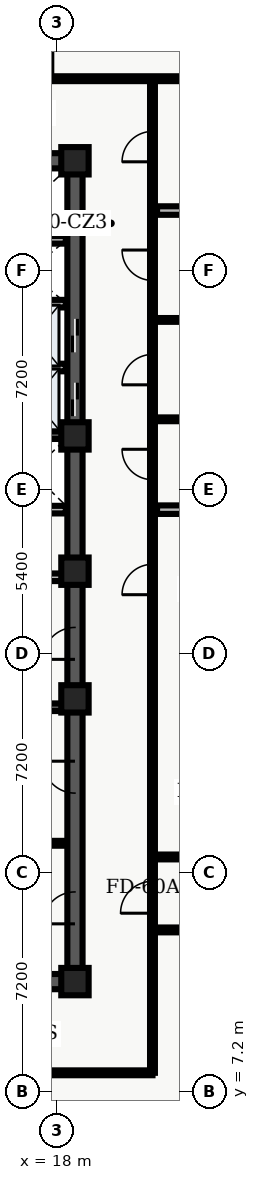
"""IFC4 building model, lengths in metres.
Left out: names, types, materials, properties, quantities, classifications, styles, units other than length and angle.
Written with IfcOpenShell. Run it as: python <this file> out.ifc"""

import sys

from ifc_helpers import new_model, entity, si_unit, converted_unit, direction, frame, origin_with_axes, origin_2d_with_axis, place, context, subcontext, project, spatial, polyline, rectangle, outline, extrude, element, fill, save


model = new_model("IFC4")
c1 = context("Model", 3, precision=1e-05, world=origin_with_axes(), true_north=direction((0.0, 1.0)))
c2 = subcontext(c1, "Body", "Model", "MODEL_VIEW")
j1 = project(units=[si_unit("LENGTHUNIT", "METRE"), converted_unit("PLANEANGLEUNIT", "DEGREE", entity("IfcPlaneAngleMeasure", 0.017), si_unit("PLANEANGLEUNIT", "RADIAN"), dimensions=[0, 0, 0, 0, 0, 0, 0])], contexts=[c1])
p1 = place(None, origin_with_axes())
s1 = spatial("IfcSite", under=j1, at=p1, CompositionType="ELEMENT")
p2 = place(p1, origin_with_axes())
s2 = spatial("IfcBuilding", under=s1, at=p2, CompositionType="ELEMENT")
p3 = place(p2, frame((0.0, 0.0, 204.3), z_axis=(0.0, 0.0, 1.0), x_axis=(1.0, 0.0, 0.0)))
s3 = spatial("IfcBuildingStorey", under=s2, at=p3, CompositionType="ELEMENT", Elevation=204.3)
p4 = place(p3, frame((11.4, 10.8, 0.0), z_axis=(0.0, 0.0, 1.0), x_axis=(1.0, 0.0, 0.0)))
e1 = element("IfcWall", 1, at=p4, inside=s3, PredefinedType="SHEAR", context=c2, shape_type="SweptSolid", body=[
    extrude(outline(polyline([(0.0, -0.25), (7.2, -0.25), (7.2, 0.25), (0.0, 0.25), (0.0, -0.25)])), origin_with_axes(), (0.0, 0.0, 1.0), 3.66),
])
p5 = place(p4, frame((2.625, 0.0, 0.0), z_axis=(0.0, 0.0, 1.0), x_axis=(1.0, 0.0, 0.0)))
e2 = element("IfcOpeningElement", 2, at=p5, cuts=e1, PredefinedType="OPENING", context=c2, shape_type="SweptSolid", body=[
    extrude(rectangle(XDim=1.05, YDim=0.52, at=origin_2d_with_axis()), origin_with_axes(), (0.0, 0.0, 1.0), 2.15),
])
p6 = place(p3, frame((11.4, 37.8, 0.0), z_axis=(0.0, 0.0, 1.0), x_axis=(1.0, 0.0, 0.0)))
e3 = element("IfcWall", 3, at=p6, inside=s3, PredefinedType="SHEAR", context=c2, shape_type="SweptSolid", body=[
    extrude(outline(polyline([(0.0, -0.25), (7.2, -0.25), (7.2, 0.25), (0.0, 0.25), (0.0, -0.25)])), origin_with_axes(), (0.0, 0.0, 1.0), 3.66),
])
p7 = place(p6, frame((2.625, 0.0, 0.0), z_axis=(0.0, 0.0, 1.0), x_axis=(1.0, 0.0, 0.0)))
e4 = element("IfcOpeningElement", 4, at=p7, cuts=e3, PredefinedType="OPENING", context=c2, shape_type="SweptSolid", body=[
    extrude(rectangle(XDim=1.05, YDim=0.52, at=origin_2d_with_axis()), origin_with_axes(), (0.0, 0.0, 1.0), 2.15),
])
p8 = place(p3, frame((18.6, 10.8, 0.0), z_axis=(0.0, 0.0, 1.0), x_axis=(0.0, 1.0, 0.0)))
e5 = element("IfcWall", 5, at=p8, inside=s3, PredefinedType="SHEAR", context=c2, shape_type="SweptSolid", body=[
    extrude(outline(polyline([(0.0, -0.25), (13.5, -0.25), (13.5, 0.25), (0.0, 0.25), (0.0, -0.25)])), origin_with_axes(), (0.0, 0.0, 1.0), 3.66),
])
p9 = place(p8, frame((11.125, 0.0, 0.0), z_axis=(0.0, 0.0, 1.0), x_axis=(1.0, 0.0, 0.0)))
e6 = element("IfcOpeningElement", 6, at=p9, cuts=e5, PredefinedType="OPENING", context=c2, shape_type="SweptSolid", body=[
    extrude(rectangle(XDim=1.05, YDim=0.52, at=origin_2d_with_axis()), origin_with_axes(), (0.0, 0.0, 1.0), 2.15),
])
p10 = place(p8, frame((2.425, 0.0, 0.0), z_axis=(0.0, 0.0, 1.0), x_axis=(1.0, 0.0, 0.0)))
e7 = element("IfcOpeningElement", 7, at=p10, cuts=e5, PredefinedType="OPENING", context=c2, shape_type="SweptSolid", body=[
    extrude(rectangle(XDim=1.05, YDim=0.52, at=origin_2d_with_axis()), origin_with_axes(), (0.0, 0.0, 1.0), 2.15),
])
p11 = place(p8, frame((6.725, 0.0, 0.0), z_axis=(0.0, 0.0, 1.0), x_axis=(1.0, 0.0, 0.0)))
e8 = element("IfcOpeningElement", 8, at=p11, cuts=e5, PredefinedType="OPENING", context=c2, shape_type="SweptSolid", body=[
    extrude(rectangle(XDim=1.05, YDim=0.52, at=origin_2d_with_axis()), origin_with_axes(), (0.0, 0.0, 1.0), 2.15),
])
p12 = place(p3, frame((18.6, 24.3, 0.0), z_axis=(0.0, 0.0, 1.0), x_axis=(0.0, 1.0, 0.0)))
e9 = element("IfcWall", 9, at=p12, inside=s3, PredefinedType="SHEAR", context=c2, shape_type="SweptSolid", body=[
    extrude(outline(polyline([(0.0, -0.25), (13.5, -0.25), (13.5, 0.25), (0.0, 0.25), (0.0, -0.25)])), origin_with_axes(), (0.0, 0.0, 1.0), 3.66),
])
p13 = place(p12, frame((5.65, 0.0, 0.0), z_axis=(0.0, 0.0, 1.0), x_axis=(1.0, 0.0, 0.0)))
e10 = element("IfcOpeningElement", 10, at=p13, cuts=e9, PredefinedType="OPENING", context=c2, shape_type="SweptSolid", body=[
    extrude(rectangle(XDim=1.1, YDim=0.52, at=origin_2d_with_axis()), origin_with_axes(), (0.0, 0.0, 1.0), 2.15),
])
p14 = place(p12, frame((7.75, 0.0, 0.0), z_axis=(0.0, 0.0, 1.0), x_axis=(1.0, 0.0, 0.0)))
e11 = element("IfcOpeningElement", 11, at=p14, cuts=e9, PredefinedType="OPENING", context=c2, shape_type="SweptSolid", body=[
    extrude(rectangle(XDim=1.1, YDim=0.52, at=origin_2d_with_axis()), origin_with_axes(), (0.0, 0.0, 1.0), 2.15),
])
for number, where, z_axis, x_axis in (
    (12, (11.65, 19.825, 0.0), (0.0, 0.0, 1.0), (1.0, 0.0, 0.0)),
    (13, (11.65, 28.775, 0.0), (0.0, 0.0, 1.0), (1.0, 0.0, 0.0)),
):
    element("IfcWall", number, at=place(p3, frame(where, z_axis=z_axis, x_axis=x_axis)), inside=s3, PredefinedType="SHEAR", context=c2, shape_type="SweptSolid", body=[
        extrude(outline(polyline([(0.0, -0.125), (6.7, -0.125), (6.7, 0.125), (0.0, 0.125), (0.0, -0.125)])), origin_with_axes(), (0.0, 0.0, 1.0), 3.66),
    ])
p15 = place(p3, frame((11.7, 24.1, 0.0), z_axis=(0.0, 0.0, 1.0), x_axis=(1.0, 0.0, 0.0)))
e14 = element("IfcWall", 14, at=p15, inside=s3, PredefinedType="SOLIDWALL", context=c2, shape_type="SweptSolid", body=[
    extrude(outline(polyline([(0.0, -0.125), (6.6, -0.125), (6.6, 0.125), (0.0, 0.125), (0.0, -0.125)])), origin_with_axes(), (0.0, 0.0, 1.0), 2.7),
])
p16 = place(p15, frame((3.6, 0.0, 0.0), z_axis=(0.0, 0.0, 1.0), x_axis=(1.0, 0.0, 0.0)))
e15 = element("IfcOpeningElement", 15, at=p16, cuts=e14, PredefinedType="OPENING", context=c2, shape_type="SweptSolid", body=[
    extrude(rectangle(XDim=0.9, YDim=0.27, at=origin_2d_with_axis()), origin_with_axes(), (0.0, 0.0, 1.0), 2.15),
])
p17 = place(p15, frame((5.65, 0.0, 0.0), z_axis=(0.0, 0.0, 1.0), x_axis=(1.0, 0.0, 0.0)))
e16 = element("IfcOpeningElement", 16, at=p17, cuts=e14, PredefinedType="OPENING", context=c2, shape_type="SweptSolid", body=[
    extrude(rectangle(XDim=0.9, YDim=0.27, at=origin_2d_with_axis()), origin_with_axes(), (0.0, 0.0, 1.0), 2.15),
])
p18 = place(p3, frame((11.7, 26.325, 0.0), z_axis=(0.0, 0.0, 1.0), x_axis=(1.0, 0.0, 0.0)))
e17 = element("IfcWall", 17, at=p18, inside=s3, PredefinedType="SOLIDWALL", context=c2, shape_type="SweptSolid", body=[
    extrude(outline(polyline([(0.0, -0.125), (6.6, -0.125), (6.6, 0.125), (0.0, 0.125), (0.0, -0.125)])), origin_with_axes(), (0.0, 0.0, 1.0), 2.7),
])
p19 = place(p18, frame((3.5, 0.0, 0.0), z_axis=(0.0, 0.0, 1.0), x_axis=(1.0, 0.0, 0.0)))
e18 = element("IfcOpeningElement", 18, at=p19, cuts=e17, PredefinedType="OPENING", context=c2, shape_type="SweptSolid", body=[
    extrude(rectangle(XDim=0.9, YDim=0.27, at=origin_2d_with_axis()), origin_with_axes(), (0.0, 0.0, 1.0), 2.15),
])
for number, where, z_axis, x_axis in (
    (19, (18.6, 10.8, 0.0), (0.0, 0.0, 1.0), (1.0, 0.0, 0.0)),
    (20, (18.6, 20.1, 0.0), (0.0, 0.0, 1.0), (1.0, 0.0, 0.0)),
    (21, (18.6, 24.3, 0.0), (0.0, 0.0, 1.0), (1.0, 0.0, 0.0)),
    (22, (18.6, 28.75, 0.0), (0.0, 0.0, 1.0), (1.0, 0.0, 0.0)),
    (23, (18.6, 37.8, 0.0), (0.0, 0.0, 1.0), (1.0, 0.0, 0.0)),
):
    element("IfcColumn", number, at=place(p3, frame(where, z_axis=z_axis, x_axis=x_axis)), inside=s3, PredefinedType="COLUMN", context=c2, shape_type="SweptSolid", body=[
        extrude(rectangle(XDim=0.9, YDim=0.9, at=origin_2d_with_axis()), origin_with_axes(), (0.0, 0.0, 1.0), 3.9),
    ])
p20 = place(p3, frame((15.84, 15.35, 0.0), z_axis=(0.0, 0.0, 1.0), x_axis=(1.0, 0.0, 0.0)))
e24 = element("IfcWall", 24, at=p20, inside=s3, PredefinedType="PARTITIONING", context=c2, shape_type="SweptSolid", body=[
    extrude(outline(polyline([(0.0, -0.08), (2.46, -0.08), (2.46, 0.08), (0.0, 0.08), (0.0, -0.08)])), origin_with_axes(), (0.0, 0.0, 1.0), 2.7),
])
for number, where, z_axis, x_axis in (
    (25, (15.84, 31.0, 0.0), (0.0, 0.0, 1.0), (1.0, 0.0, 0.0)),
    (26, (15.84, 33.1, 0.0), (0.0, 0.0, 1.0), (1.0, 0.0, 0.0)),
    (27, (15.84, 35.2, 0.0), (0.0, 0.0, 1.0), (1.0, 0.0, 0.0)),
):
    element("IfcWall", number, at=place(p3, frame(where, z_axis=z_axis, x_axis=x_axis)), inside=s3, PredefinedType="SOLIDWALL", context=c2, shape_type="SweptSolid", body=[
        extrude(outline(polyline([(0.0, -0.125), (2.46, -0.125), (2.46, 0.125), (0.0, 0.125), (0.0, -0.125)])), origin_with_axes(), (0.0, 0.0, 1.0), 2.7),
    ])
p21 = place(p3, frame((2.6, 7.8, 0.0), z_axis=(0.0, 0.0, 1.0), x_axis=(1.0, 0.0, 0.0)))
e28 = element("IfcWall", 28, at=p21, inside=s3, PredefinedType="PARTITIONING", context=c2, shape_type="SweptSolid", body=[
    extrude(outline(polyline([(0.0, -0.08), (18.55, -0.08), (18.55, 0.08), (0.0, 0.08), (0.0, -0.08)])), origin_with_axes(), (0.0, 0.0, 1.0), 2.7),
])
p22 = place(p21, frame((9.245, 0.0, 0.0), z_axis=(0.0, 0.0, 1.0), x_axis=(1.0, 0.0, 0.0)))
e29 = element("IfcOpeningElement", 29, at=p22, cuts=e28, PredefinedType="OPENING", context=c2, shape_type="SweptSolid", body=[
    extrude(rectangle(XDim=1.0, YDim=0.18, at=origin_2d_with_axis()), origin_with_axes(), (0.0, 0.0, 1.0), 2.15),
])
p23 = place(p3, frame((2.6, 40.5, 0.0), z_axis=(0.0, 0.0, 1.0), x_axis=(1.0, 0.0, 0.0)))
e30 = element("IfcWall", 30, at=p23, inside=s3, PredefinedType="PARTITIONING", context=c2, shape_type="SweptSolid", body=[
    extrude(outline(polyline([(0.0, -0.08), (26.946, -0.08), (26.946, 0.08), (0.0, 0.08), (0.0, -0.08)])), origin_with_axes(), (0.0, 0.0, 1.0), 2.7),
])
p24 = place(p23, frame((1.768, 0.0, 0.0), z_axis=(0.0, 0.0, 1.0), x_axis=(1.0, 0.0, 0.0)))
e31 = element("IfcOpeningElement", 31, at=p24, cuts=e30, PredefinedType="OPENING", context=c2, shape_type="SweptSolid", body=[
    extrude(rectangle(XDim=1.0, YDim=0.18, at=origin_2d_with_axis()), origin_with_axes(), (0.0, 0.0, 1.0), 2.15),
])
p25 = place(p23, frame((7.824, 0.0, 0.0), z_axis=(0.0, 0.0, 1.0), x_axis=(1.0, 0.0, 0.0)))
e32 = element("IfcOpeningElement", 32, at=p25, cuts=e30, PredefinedType="OPENING", context=c2, shape_type="SweptSolid", body=[
    extrude(rectangle(XDim=1.0, YDim=0.18, at=origin_2d_with_axis()), origin_with_axes(), (0.0, 0.0, 1.0), 2.15),
])
p26 = place(p23, frame((10.411, 0.0, 0.0), z_axis=(0.0, 0.0, 1.0), x_axis=(1.0, 0.0, 0.0)))
e33 = element("IfcOpeningElement", 33, at=p26, cuts=e30, PredefinedType="OPENING", context=c2, shape_type="SweptSolid", body=[
    extrude(rectangle(XDim=1.0, YDim=0.18, at=origin_2d_with_axis()), origin_with_axes(), (0.0, 0.0, 1.0), 2.15),
])
p27 = place(p23, frame((14.771, 0.0, 0.0), z_axis=(0.0, 0.0, 1.0), x_axis=(1.0, 0.0, 0.0)))
e34 = element("IfcOpeningElement", 34, at=p27, cuts=e30, PredefinedType="OPENING", context=c2, shape_type="SweptSolid", body=[
    extrude(rectangle(XDim=1.0, YDim=0.18, at=origin_2d_with_axis()), origin_with_axes(), (0.0, 0.0, 1.0), 2.15),
])
p28 = place(p3, frame((21.15, 7.8, 0.0), z_axis=(0.0, 0.0, 1.0), x_axis=(0.0, 1.0, 0.0)))
e35 = element("IfcWall", 35, at=p28, inside=s3, PredefinedType="PARTITIONING", context=c2, shape_type="SweptSolid", body=[
    extrude(outline(polyline([(0.0, -0.08), (32.7, -0.08), (32.7, 0.08), (0.0, 0.08), (0.0, -0.08)])), origin_with_axes(), (0.0, 0.0, 1.0), 2.7),
])
p29 = place(p28, frame((16.227, 0.0, 0.0), z_axis=(0.0, 0.0, 1.0), x_axis=(1.0, 0.0, 0.0)))
e36 = element("IfcOpeningElement", 36, at=p29, cuts=e35, PredefinedType="OPENING", context=c2, shape_type="SweptSolid", body=[
    extrude(rectangle(XDim=1.0, YDim=0.18, at=origin_2d_with_axis()), origin_with_axes(), (0.0, 0.0, 1.0), 2.15),
])
p30 = place(p28, frame((20.01, 0.0, 0.0), z_axis=(0.0, 0.0, 1.0), x_axis=(1.0, 0.0, 0.0)))
e37 = element("IfcOpeningElement", 37, at=p30, cuts=e35, PredefinedType="OPENING", context=c2, shape_type="SweptSolid", body=[
    extrude(rectangle(XDim=1.0, YDim=0.18, at=origin_2d_with_axis()), origin_with_axes(), (0.0, 0.0, 1.0), 2.15),
])
p31 = place(p28, frame((23.131, 0.0, 0.0), z_axis=(0.0, 0.0, 1.0), x_axis=(1.0, 0.0, 0.0)))
e38 = element("IfcOpeningElement", 38, at=p31, cuts=e35, PredefinedType="OPENING", context=c2, shape_type="SweptSolid", body=[
    extrude(rectangle(XDim=1.0, YDim=0.18, at=origin_2d_with_axis()), origin_with_axes(), (0.0, 0.0, 1.0), 2.15),
])
p32 = place(p28, frame((26.564, 0.0, 0.0), z_axis=(0.0, 0.0, 1.0), x_axis=(1.0, 0.0, 0.0)))
e39 = element("IfcOpeningElement", 39, at=p32, cuts=e35, PredefinedType="OPENING", context=c2, shape_type="SweptSolid", body=[
    extrude(rectangle(XDim=1.0, YDim=0.18, at=origin_2d_with_axis()), origin_with_axes(), (0.0, 0.0, 1.0), 2.15),
])
p33 = place(p28, frame((30.466, 0.0, 0.0), z_axis=(0.0, 0.0, 1.0), x_axis=(1.0, 0.0, 0.0)))
e40 = element("IfcOpeningElement", 40, at=p33, cuts=e35, PredefinedType="OPENING", context=c2, shape_type="SweptSolid", body=[
    extrude(rectangle(XDim=1.0, YDim=0.18, at=origin_2d_with_axis()), origin_with_axes(), (0.0, 0.0, 1.0), 2.15),
])
p34 = place(p28, frame((5.775, 0.0, 0.0), z_axis=(0.0, 0.0, 1.0), x_axis=(1.0, 0.0, 0.0)))
e41 = element("IfcOpeningElement", 41, at=p34, cuts=e35, PredefinedType="OPENING", context=c2, shape_type="SweptSolid", body=[
    extrude(rectangle(XDim=1.05, YDim=0.18, at=origin_2d_with_axis()), origin_with_axes(), (0.0, 0.0, 1.0), 2.15),
])
p35 = place(p3, frame((21.3, 26.324, 0.0), z_axis=(0.0, 0.0, 1.0), x_axis=(1.0, 0.0, 0.0)))
e42 = element("IfcWall", 42, at=p35, inside=s3, PredefinedType="PARTITIONING", context=c2, shape_type="SweptSolid", body=[
    extrude(outline(polyline([(0.0, -0.14), (8.246, -0.14), (8.246, 0.14), (0.0, 0.14), (0.0, -0.14)])), origin_with_axes(), (0.0, 0.0, 1.0), 2.7),
])
for number, where, z_axis, x_axis in (
    (43, (21.3, 29.296, 0.0), (0.0, 0.0, 1.0), (1.0, 0.0, 0.0)),
    (44, (21.3, 32.565, 0.0), (0.0, 0.0, 1.0), (1.0, 0.0, 0.0)),
):
    element("IfcWall", number, at=place(p3, frame(where, z_axis=z_axis, x_axis=x_axis)), inside=s3, PredefinedType="PARTITIONING", context=c2, shape_type="SweptSolid", body=[
        extrude(outline(polyline([(0.0, -0.062), (8.246, -0.062), (8.246, 0.062), (0.0, 0.062), (0.0, -0.062)])), origin_with_axes(), (0.0, 0.0, 1.0), 2.7),
    ])
p36 = place(p3, frame((21.3, 36.163, 0.0), z_axis=(0.0, 0.0, 1.0), x_axis=(1.0, 0.0, 0.0)))
e45 = element("IfcWall", 45, at=p36, inside=s3, PredefinedType="PARTITIONING", context=c2, shape_type="SweptSolid", body=[
    extrude(outline(polyline([(0.0, -0.14), (8.246, -0.14), (8.246, 0.14), (0.0, 0.14), (0.0, -0.14)])), origin_with_axes(), (0.0, 0.0, 1.0), 2.7),
])
p37 = place(p3, frame((21.15, 12.5, 0.0), z_axis=(0.0, 0.0, 1.0), x_axis=(1.0, 0.0, 0.0)))
e46 = element("IfcWall", 46, at=p37, inside=s3, PredefinedType="PARTITIONING", context=c2, shape_type="SweptSolid", body=[
    extrude(outline(polyline([(0.0, -0.08), (15.2, -0.08), (15.2, 0.08), (0.0, 0.08), (0.0, -0.08)])), origin_with_axes(), (0.0, 0.0, 1.0), 2.7),
])
p38 = place(p37, frame((7.65, 0.0, 0.0), z_axis=(0.0, 0.0, 1.0), x_axis=(1.0, 0.0, 0.0)))
e47 = element("IfcOpeningElement", 47, at=p38, cuts=e46, PredefinedType="OPENING", context=c2, shape_type="SweptSolid", body=[
    extrude(rectangle(XDim=1.0, YDim=0.18, at=origin_2d_with_axis()), origin_with_axes(), (0.0, 0.0, 1.0), 2.15),
])
p39 = place(p3, frame((21.15, 14.9, 0.0), z_axis=(0.0, 0.0, 1.0), x_axis=(1.0, 0.0, 0.0)))
e48 = element("IfcWall", 48, at=p39, inside=s3, PredefinedType="PARTITIONING", context=c2, shape_type="SweptSolid", body=[
    extrude(outline(polyline([(0.0, -0.08), (15.2, -0.08), (15.2, 0.08), (0.0, 0.08), (0.0, -0.08)])), origin_with_axes(), (0.0, 0.0, 1.0), 2.7),
])
p40 = place(p39, frame((2.57, 0.0, 0.0), z_axis=(0.0, 0.0, 1.0), x_axis=(1.0, 0.0, 0.0)))
e49 = element("IfcOpeningElement", 49, at=p40, cuts=e48, PredefinedType="OPENING", context=c2, shape_type="SweptSolid", body=[
    extrude(rectangle(XDim=1.0, YDim=0.18, at=origin_2d_with_axis()), origin_with_axes(), (0.0, 0.0, 1.0), 2.15),
])
p41 = place(p39, frame((6.476, 0.0, 0.0), z_axis=(0.0, 0.0, 1.0), x_axis=(1.0, 0.0, 0.0)))
e50 = element("IfcOpeningElement", 50, at=p41, cuts=e48, PredefinedType="OPENING", context=c2, shape_type="SweptSolid", body=[
    extrude(rectangle(XDim=1.0, YDim=0.18, at=origin_2d_with_axis()), origin_with_axes(), (0.0, 0.0, 1.0), 2.15),
])
p42 = place(p39, frame((9.667, 0.0, 0.0), z_axis=(0.0, 0.0, 1.0), x_axis=(1.0, 0.0, 0.0)))
e51 = element("IfcOpeningElement", 51, at=p42, cuts=e48, PredefinedType="OPENING", context=c2, shape_type="SweptSolid", body=[
    extrude(rectangle(XDim=1.0, YDim=0.18, at=origin_2d_with_axis()), origin_with_axes(), (0.0, 0.0, 1.0), 2.15),
])
p43 = place(p39, frame((13.232, 0.0, 0.0), z_axis=(0.0, 0.0, 1.0), x_axis=(1.0, 0.0, 0.0)))
e52 = element("IfcOpeningElement", 52, at=p43, cuts=e48, PredefinedType="OPENING", context=c2, shape_type="SweptSolid", body=[
    extrude(rectangle(XDim=1.0, YDim=0.18, at=origin_2d_with_axis()), origin_with_axes(), (0.0, 0.0, 1.0), 2.15),
])
p44 = place(p12, frame((5.65, 0.0, 0.0), z_axis=(0.0, 0.0, 1.0), x_axis=(1.0, 0.0, 0.0)))
e53 = element("IfcDoor", 53, at=p44, inside=s3, OperationType="SLIDING_TO_LEFT", PredefinedType="DOOR", context=c2, shape_type="SweptSolid", body=[
    extrude(rectangle(XDim=1.1, YDim=0.09, at=origin_2d_with_axis()), origin_with_axes(), (0.0, 0.0, 1.0), 2.15),
])
fill(e10, e53)
p45 = place(p12, frame((7.75, 0.0, 0.0), z_axis=(0.0, 0.0, 1.0), x_axis=(1.0, 0.0, 0.0)))
e54 = element("IfcDoor", 54, at=p45, inside=s3, OperationType="SLIDING_TO_RIGHT", PredefinedType="DOOR", context=c2, shape_type="SweptSolid", body=[
    extrude(rectangle(XDim=1.1, YDim=0.09, at=origin_2d_with_axis()), origin_with_axes(), (0.0, 0.0, 1.0), 2.15),
])
fill(e11, e54)
p46 = place(p8, frame((11.125, 0.0, 0.0), z_axis=(0.0, 0.0, 1.0), x_axis=(1.0, 0.0, 0.0)))
e55 = element("IfcDoor", 55, at=p46, inside=s3, OperationType="SINGLE_SWING_LEFT", PredefinedType="DOOR", context=c2, shape_type="SweptSolid", body=[
    extrude(rectangle(XDim=1.05, YDim=0.09, at=origin_2d_with_axis()), origin_with_axes(), (0.0, 0.0, 1.0), 2.15),
])
fill(e6, e55)
p47 = place(p8, frame((2.425, 0.0, 0.0), z_axis=(0.0, 0.0, 1.0), x_axis=(1.0, 0.0, 0.0)))
e56 = element("IfcDoor", 56, at=p47, inside=s3, OperationType="SINGLE_SWING_LEFT", PredefinedType="DOOR", context=c2, shape_type="SweptSolid", body=[
    extrude(rectangle(XDim=1.05, YDim=0.09, at=origin_2d_with_axis()), origin_with_axes(), (0.0, 0.0, 1.0), 2.15),
])
fill(e7, e56)
p48 = place(p8, frame((6.725, 0.0, 0.0), z_axis=(0.0, 0.0, 1.0), x_axis=(1.0, 0.0, 0.0)))
e57 = element("IfcDoor", 57, at=p48, inside=s3, OperationType="SINGLE_SWING_RIGHT", PredefinedType="DOOR", context=c2, shape_type="SweptSolid", body=[
    extrude(rectangle(XDim=1.05, YDim=0.09, at=origin_2d_with_axis()), origin_with_axes(), (0.0, 0.0, 1.0), 2.15),
])
fill(e8, e57)
p49 = place(p23, frame((14.771, 0.0, 0.0), z_axis=(0.0, 0.0, 1.0), x_axis=(1.0, 0.0, 0.0)))
e58 = element("IfcDoor", 58, at=p49, inside=s3, OperationType="SINGLE_SWING_RIGHT", PredefinedType="DOOR", context=c2, shape_type="SweptSolid", body=[
    extrude(rectangle(XDim=1.0, YDim=0.09, at=origin_2d_with_axis()), origin_with_axes(), (0.0, 0.0, 1.0), 2.15),
])
fill(e34, e58)
p50 = place(p28, frame((16.227, 0.0, 0.0), z_axis=(0.0, 0.0, 1.0), x_axis=(1.0, 0.0, 0.0)))
e59 = element("IfcDoor", 59, at=p50, inside=s3, OperationType="SINGLE_SWING_LEFT", PredefinedType="DOOR", context=c2, shape_type="SweptSolid", body=[
    extrude(rectangle(XDim=1.0, YDim=0.09, at=origin_2d_with_axis()), origin_with_axes(), (0.0, 0.0, 1.0), 2.15),
])
fill(e36, e59)
p51 = place(p28, frame((20.01, 0.0, 0.0), z_axis=(0.0, 0.0, 1.0), x_axis=(1.0, 0.0, 0.0)))
e60 = element("IfcDoor", 60, at=p51, inside=s3, OperationType="SINGLE_SWING_RIGHT", PredefinedType="DOOR", context=c2, shape_type="SweptSolid", body=[
    extrude(rectangle(XDim=1.0, YDim=0.09, at=origin_2d_with_axis()), origin_with_axes(), (0.0, 0.0, 1.0), 2.15),
])
fill(e37, e60)
p52 = place(p28, frame((23.131, 0.0, 0.0), z_axis=(0.0, 0.0, 1.0), x_axis=(1.0, 0.0, 0.0)))
e61 = element("IfcDoor", 61, at=p52, inside=s3, OperationType="SINGLE_SWING_LEFT", PredefinedType="DOOR", context=c2, shape_type="SweptSolid", body=[
    extrude(rectangle(XDim=1.0, YDim=0.09, at=origin_2d_with_axis()), origin_with_axes(), (0.0, 0.0, 1.0), 2.15),
])
fill(e38, e61)
p53 = place(p28, frame((26.564, 0.0, 0.0), z_axis=(0.0, 0.0, 1.0), x_axis=(1.0, 0.0, 0.0)))
e62 = element("IfcDoor", 62, at=p53, inside=s3, OperationType="SINGLE_SWING_RIGHT", PredefinedType="DOOR", context=c2, shape_type="SweptSolid", body=[
    extrude(rectangle(XDim=1.0, YDim=0.09, at=origin_2d_with_axis()), origin_with_axes(), (0.0, 0.0, 1.0), 2.15),
])
fill(e39, e62)
p54 = place(p28, frame((30.466, 0.0, 0.0), z_axis=(0.0, 0.0, 1.0), x_axis=(1.0, 0.0, 0.0)))
e63 = element("IfcDoor", 63, at=p54, inside=s3, OperationType="SINGLE_SWING_LEFT", PredefinedType="DOOR", context=c2, shape_type="SweptSolid", body=[
    extrude(rectangle(XDim=1.0, YDim=0.09, at=origin_2d_with_axis()), origin_with_axes(), (0.0, 0.0, 1.0), 2.15),
])
fill(e40, e63)
p55 = place(p28, frame((5.775, 0.0, 0.0), z_axis=(0.0, 0.0, 1.0), x_axis=(1.0, 0.0, 0.0)))
e64 = element("IfcDoor", 64, at=p55, inside=s3, OperationType="SINGLE_SWING_LEFT", PredefinedType="DOOR", context=c2, shape_type="SweptSolid", body=[
    extrude(rectangle(XDim=1.05, YDim=0.09, at=origin_2d_with_axis()), origin_with_axes(), (0.0, 0.0, 1.0), 2.15),
])
fill(e41, e64)
save(model, sys.argv[1])
